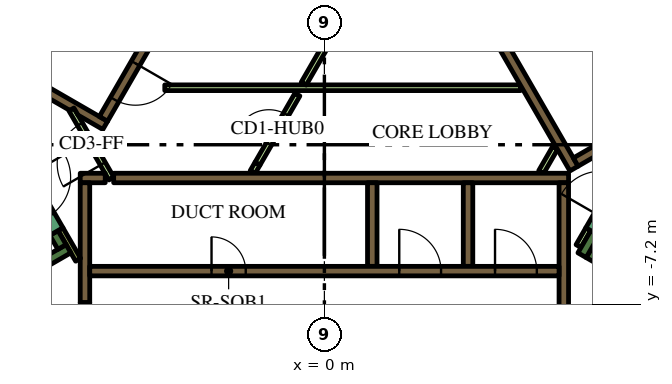
"""IFC4 building model, lengths in metres.
Left out: names, types, materials, properties, quantities, classifications, styles, units other than length and angle.
Written with IfcOpenShell. Run it as: python <this file> out.ifc"""

import sys

from ifc_helpers import new_model, si_unit, direction, frame, frame_2d, origin, place, context, subcontext, project, spatial, polyline, rectangle, outline, extrude, element, fill, save


model = new_model("IFC4")
c1 = context("Model", 3, precision=1e-05, world=origin(), true_north=direction((0.0, 1.0)))
c2 = subcontext(c1, "Body", "Model", "MODEL_VIEW")
j1 = project(units=[si_unit("LENGTHUNIT", "METRE"), si_unit("PLANEANGLEUNIT", "RADIAN")], contexts=[c1])
p1 = place(None, origin())
s1 = spatial("IfcSite", under=j1, at=p1, CompositionType="ELEMENT")
p2 = place(p1, origin())
s2 = spatial("IfcBuilding", under=s1, at=p2, CompositionType="ELEMENT")
p3 = place(p2, frame((0.0, 0.0, 91.5)))
s3 = spatial("IfcBuildingStorey", under=s2, at=p3, CompositionType="ELEMENT", Elevation=91.5)
p4 = place(p3, frame((6.776, 13.364, 0.0), z_axis=(0.0, 0.0, 1.0), x_axis=(0.500004177138, -0.8660229921, 0.0)))
e1 = element("IfcWall", 1, at=p4, inside=s3, PredefinedType="SOLIDWALL", context=c2, shape_type="SweptSolid", body=[
    extrude(rectangle(XDim=20.204, YDim=0.9, at=frame_2d((10.102, 0.0))), origin(), (0.0, 0.0, 1.0), 3.9),
])
p5 = place(p3, frame((-15.36, -1.503, 0.0), z_axis=(0.0, 0.0, 1.0), x_axis=(0.50000389221, 0.866023156604, 0.0)))
e2 = element("IfcWall", 2, at=p5, inside=s3, PredefinedType="SOLIDWALL", context=c2, shape_type="SweptSolid", body=[
    extrude(rectangle(XDim=21.0, YDim=0.9, at=frame_2d((10.5, 0.0))), origin(), (0.0, 0.0, 1.0), 3.9),
])
p6 = place(p3, frame((12.84, -9.261, 0.0), z_axis=(0.0, 0.0, 1.0), x_axis=(-0.866013990052, 0.500019768644, 0.0)))
e3 = element("IfcWall", 3, at=p6, inside=s3, PredefinedType="SOLIDWALL", context=c2, shape_type="SweptSolid", body=[
    extrude(rectangle(XDim=6.8, YDim=0.25, at=frame_2d((3.4, 0.0))), origin(), (0.0, 0.0, 1.0), 3.9),
])
p7 = place(p3, frame((6.78, -5.906, 0.0), z_axis=(0.0, 0.0, 1.0), x_axis=(0.500223362819, 0.865896406789, 0.0)))
e4 = element("IfcWall", 4, at=p7, inside=s3, PredefinedType="SOLIDWALL", context=c2, shape_type="SweptSolid", body=[
    extrude(rectangle(XDim=0.675, YDim=0.25, at=frame_2d((0.337, 0.0))), origin(), (0.0, 0.0, 1.0), 3.9),
])
p8 = place(p3, frame((-12.84, -9.261, 0.0), z_axis=(0.0, 0.0, 1.0), x_axis=(0.866016039709, 0.500016218704, 0.0)))
e5 = element("IfcWall", 5, at=p8, inside=s3, PredefinedType="SOLIDWALL", context=c2, shape_type="SweptSolid", body=[
    extrude(rectangle(XDim=7.05, YDim=0.25, at=frame_2d((3.525, 0.0))), origin(), (0.0, 0.0, 1.0), 3.9),
])
p9 = place(p3, frame((-6.905, -5.69, 0.0), z_axis=(0.0, 0.0, 1.0), x_axis=(-0.500402024738, 0.865793170242, 0.0)))
e6 = element("IfcWall", 6, at=p9, inside=s3, PredefinedType="SOLIDWALL", context=c2, shape_type="SweptSolid", body=[
    extrude(rectangle(XDim=0.425, YDim=0.25, at=frame_2d((0.212, 0.0))), origin(), (0.0, 0.0, 1.0), 3.9),
])
p10 = place(p3, frame((-5.545, -3.875, 0.0), z_axis=(0.0, 0.0, 1.0), x_axis=(1.0, 0.0, 0.0)))
e7 = element("IfcWall", 7, at=p10, inside=s3, PredefinedType="SOLIDWALL", context=c2, shape_type="SweptSolid", body=[
    extrude(rectangle(XDim=11.97, YDim=0.25, at=frame_2d((5.985, 0.0))), origin(), (0.0, 0.0, 1.0), 3.9),
])
p11 = place(p3, frame((-6.425, -3.875, 0.0), z_axis=(0.0, 0.0, 1.0), x_axis=(1.0, 0.0, 0.0)))
e8 = element("IfcWall", 8, at=p11, inside=s3, PredefinedType="SOLIDWALL", context=c2, shape_type="SweptSolid", body=[
    extrude(rectangle(XDim=0.658, YDim=0.25, at=frame_2d((0.329, 0.0))), origin(), (0.0, 0.0, 1.0), 3.9),
])
p12 = place(p3, frame((6.3, -7.268, 0.0), z_axis=(0.0, 0.0, 1.0), x_axis=(0.0, 1.0, 0.0)))
e9 = element("IfcWall", 9, at=p12, inside=s3, PredefinedType="SOLIDWALL", context=c2, shape_type="SweptSolid", body=[
    extrude(rectangle(XDim=3.268, YDim=0.25, at=frame_2d((1.634, 0.0))), origin(), (0.0, 0.0, 1.0), 3.9),
])
for number, where, z_axis, x_axis in (
    (10, (3.78, -4.0, 0.0), (0.0, 0.0, 1.0), (0.0, -1.0, 0.0)),
    (11, (1.26, -4.0, 0.0), (0.0, 0.0, 1.0), (0.0, -1.0, 0.0)),
):
    element("IfcWall", number, at=place(p3, frame(where, z_axis=z_axis, x_axis=x_axis)), inside=s3, PredefinedType="SOLIDWALL", context=c2, shape_type="SweptSolid", body=[
        extrude(rectangle(XDim=2.2, YDim=0.25, at=frame_2d((1.1, 0.0))), origin(), (0.0, 0.0, 1.0), 3.9),
    ])
p13 = place(p3, frame((-6.3, -4.0, 0.0), z_axis=(0.0, 0.0, 1.0), x_axis=(0.0, -1.0, 0.0)))
e12 = element("IfcWall", 12, at=p13, inside=s3, PredefinedType="SOLIDWALL", context=c2, shape_type="SweptSolid", body=[
    extrude(rectangle(XDim=3.154, YDim=0.25, at=frame_2d((1.577, 0.0))), origin(), (0.0, 0.0, 1.0), 3.9),
])
p14 = place(p3, origin())
e13 = element("IfcWall", 13, at=p14, inside=s3, PredefinedType="SOLIDWALL", context=c2, shape_type="SweptSolid", body=[
    extrude(outline(polyline([(0.566, 6.725), (0.566, 6.875), (0.566, 6.875), (0.565, 6.875), (0.361, 6.875), (0.035, 7.439), (0.252, 7.564), (0.377, 7.348), (6.552, -3.348), (6.677, -3.564), (6.46, -3.689), (0.448, 6.725), (0.565, 6.725), (0.566, 6.725), (0.566, 6.725)])), origin(), (0.0, 0.0, 1.0), 3.9),
])
p15 = place(p3, frame((6.614, -3.456, 0.0), z_axis=(0.0, 0.0, 1.0), x_axis=(0.866031582473, 0.499989298045, 0.0)))
e14 = element("IfcWall", 14, at=p15, inside=s3, PredefinedType="SOLIDWALL", context=c2, shape_type="SweptSolid", body=[
    extrude(rectangle(XDim=2.455, YDim=0.25, at=frame_2d((1.228, 0.0))), origin(), (0.0, 0.0, 1.0), 3.9),
])
p16 = place(p3, frame((-8.06, -1.311, 0.0), z_axis=(0.0, 0.0, 1.0), x_axis=(0.50000273126, 0.866023826885, 0.0)))
e15 = element("IfcWall", 15, at=p16, inside=s3, PredefinedType="SOLIDWALL", context=c2, shape_type="SweptSolid", body=[
    extrude(rectangle(XDim=10.33, YDim=0.25, at=frame_2d((5.165, 0.0))), origin(), (0.0, 0.0, 1.0), 3.9),
])
e16 = element("IfcWall", 16, at=p14, inside=s3, PredefinedType="SOLIDWALL", context=c2, shape_type="SweptSolid", body=[
    extrude(outline(polyline([(-5.922, -2.257), (-5.922, -2.257), (-5.705, -2.382), (-5.83, -2.598), (-6.483, -2.221), (-6.591, -2.033), (-6.591, -2.033), (-6.7, -2.096), (-7.952, -1.373), (-7.827, -1.156), (-5.922, -2.257)])), origin(), (0.0, 0.0, 1.0), 3.9),
])
p17 = place(p3, frame((-6.48, -6.027, 0.0), z_axis=(0.0, 0.0, 1.0), x_axis=(-0.499927229454, 0.866067413802, 0.0)))
e17 = element("IfcWall", 17, at=p17, inside=s3, PredefinedType="PARTITIONING", context=c2, shape_type="SweptSolid", body=[
    extrude(rectangle(XDim=0.929, YDim=0.15, at=frame_2d((0.464, 0.0))), origin(), (0.0, 0.0, 1.0), 3.9),
])
p18 = place(p3, frame((-1.887, -3.718, 0.0), z_axis=(0.0, 0.0, 1.0), x_axis=(0.500165633897, 0.865929753888, 0.0)))
e18 = element("IfcWall", 18, at=p18, inside=s3, PredefinedType="PARTITIONING", context=c2, shape_type="SweptSolid", body=[
    extrude(rectangle(XDim=0.254, YDim=0.15, at=frame_2d((0.127, 0.0))), origin(), (0.0, 0.0, 1.0), 2.75),
])
p19 = place(p3, frame((6.945, -5.222, 0.0), z_axis=(0.0, 0.0, 1.0), x_axis=(-0.499818422106, -0.866130212453, 0.0)))
e19 = element("IfcWall", 19, at=p19, inside=s3, PredefinedType="PARTITIONING", context=c2, shape_type="SweptSolid", body=[
    extrude(rectangle(XDim=0.514, YDim=0.15, at=frame_2d((0.257, 0.0))), origin(), (0.0, 0.0, 1.0), 2.75),
])
p20 = place(p3, frame((5.705, -3.718, 0.0), z_axis=(0.0, 0.0, 1.0), x_axis=(0.499962090823, 0.866047289552, 0.0)))
e20 = element("IfcWall", 20, at=p20, inside=s3, PredefinedType="PARTITIONING", context=c2, shape_type="SweptSolid", body=[
    extrude(rectangle(XDim=0.735, YDim=0.15, at=frame_2d((0.367, 0.0))), origin(), (0.0, 0.0, 1.0), 2.75),
])
p21 = place(p3, frame((-4.2, -1.5, 0.0), z_axis=(0.0, 0.0, 1.0), x_axis=(1.0, 0.0, 0.0)))
e21 = element("IfcWall", 21, at=p21, inside=s3, PredefinedType="PARTITIONING", context=c2, shape_type="SweptSolid", body=[
    extrude(rectangle(XDim=9.359, YDim=0.15, at=frame_2d((4.68, 0.0))), origin(), (0.0, 0.0, 1.0), 2.75),
])
p22 = place(p3, frame((-0.544, -1.393, 0.0), z_axis=(0.0, 0.0, 1.0), x_axis=(0.499928740635, 0.866066541489, 0.0)))
e22 = element("IfcWall", 22, at=p22, inside=s3, PredefinedType="PARTITIONING", context=c2, shape_type="SweptSolid", body=[
    extrude(rectangle(XDim=1.912, YDim=0.15, at=frame_2d((0.956, 0.0))), origin(), (0.0, 0.0, 1.0), 2.75),
])
p23 = place(p3, frame((-6.175, -6.325, 0.0), z_axis=(0.0, 0.0, 1.0), x_axis=(1.0, 0.0, 0.0)))
e23 = element("IfcWall", 23, at=p23, inside=s3, PredefinedType="SOLIDWALL", context=c2, shape_type="SweptSolid", body=[
    extrude(rectangle(XDim=12.35, YDim=0.25, at=frame_2d((6.175, 0.0))), origin(), (0.0, 0.0, 1.0), 3.9),
])
p24 = place(p23, frame((3.205, 0.0, 0.0)))
e24 = element("IfcOpeningElement", 24, at=p24, cuts=e23, PredefinedType="OPENING", context=c2, shape_type="SweptSolid", body=[
    extrude(rectangle(XDim=0.9, YDim=2.1, at=frame_2d((0.45, 1.05))), frame((0.0, 0.135, 0.0), z_axis=(0.0, -1.0, 0.0), x_axis=(1.0, 0.0, 0.0)), (0.0, 0.0, 1.0), 0.27),
])
p25 = place(p23, frame((8.145, 0.0, 0.0)))
e25 = element("IfcOpeningElement", 25, at=p25, cuts=e23, PredefinedType="OPENING", context=c2, shape_type="SweptSolid", body=[
    extrude(rectangle(XDim=1.1, YDim=2.1, at=frame_2d((0.55, 1.05))), frame((0.0, 0.135, 0.0), z_axis=(0.0, -1.0, 0.0), x_axis=(1.0, 0.0, 0.0)), (0.0, 0.0, 1.0), 0.27),
])
p26 = place(p23, frame((10.665, 0.0, 0.0)))
e26 = element("IfcOpeningElement", 26, at=p26, cuts=e23, PredefinedType="OPENING", context=c2, shape_type="SweptSolid", body=[
    extrude(rectangle(XDim=1.1, YDim=2.1, at=frame_2d((0.55, 1.05))), frame((0.0, 0.135, 0.0), z_axis=(0.0, -1.0, 0.0), x_axis=(1.0, 0.0, 0.0)), (0.0, 0.0, 1.0), 0.27),
])
p27 = place(p3, frame((8.565, -2.185, 0.0), z_axis=(0.0, 0.0, 1.0), x_axis=(-0.499997954832, 0.866026584559, 0.0)))
e27 = element("IfcWall", 27, at=p27, inside=s3, PredefinedType="SOLIDWALL", context=c2, shape_type="SweptSolid", body=[
    extrude(rectangle(XDim=12.35, YDim=0.25, at=frame_2d((6.175, 0.0))), origin(), (0.0, 0.0, 1.0), 3.9),
])
p28 = place(p27, frame((5.725, 0.0, 0.0)))
e28 = element("IfcOpeningElement", 28, at=p28, cuts=e27, PredefinedType="OPENING", context=c2, shape_type="SweptSolid", body=[
    extrude(rectangle(XDim=0.9, YDim=2.1, at=frame_2d((0.45, 1.05))), frame((0.0, 0.135, 0.0), z_axis=(0.0, -1.0, 0.0), x_axis=(1.0, 0.0, 0.0)), (0.0, 0.0, 1.0), 0.27),
])
p29 = place(p3, frame((-0.898, 6.194, 0.0), z_axis=(0.0, 0.0, 1.0), x_axis=(-0.499996202215, -0.866027596426, 0.0)))
e29 = element("IfcWall", 29, at=p29, inside=s3, PredefinedType="SOLIDWALL", context=c2, shape_type="SweptSolid", body=[
    extrude(rectangle(XDim=9.83, YDim=0.25, at=frame_2d((4.915, 0.0))), origin(), (0.0, 0.0, 1.0), 3.9),
])
p30 = place(p29, frame((0.585, 0.0, 0.0)))
e30 = element("IfcOpeningElement", 30, at=p30, cuts=e29, PredefinedType="OPENING", context=c2, shape_type="SweptSolid", body=[
    extrude(rectangle(XDim=1.1, YDim=2.1, at=frame_2d((0.55, 1.05))), frame((0.0, 0.135, 0.0), z_axis=(0.0, -1.0, 0.0), x_axis=(1.0, 0.0, 0.0)), (0.0, 0.0, 1.0), 0.27),
])
p31 = place(p29, frame((3.105, 0.0, 0.0)))
e31 = element("IfcOpeningElement", 31, at=p31, cuts=e29, PredefinedType="OPENING", context=c2, shape_type="SweptSolid", body=[
    extrude(rectangle(XDim=1.1, YDim=2.1, at=frame_2d((0.55, 1.05))), frame((0.0, 0.135, 0.0), z_axis=(0.0, -1.0, 0.0), x_axis=(1.0, 0.0, 0.0)), (0.0, 0.0, 1.0), 0.27),
])
p32 = place(p29, frame((5.625, 0.0, 0.0)))
e32 = element("IfcOpeningElement", 32, at=p32, cuts=e29, PredefinedType="OPENING", context=c2, shape_type="SweptSolid", body=[
    extrude(rectangle(XDim=1.1, YDim=2.1, at=frame_2d((0.55, 1.05))), frame((0.0, 0.135, 0.0), z_axis=(0.0, -1.0, 0.0), x_axis=(1.0, 0.0, 0.0)), (0.0, 0.0, 1.0), 0.27),
])
p33 = place(p29, frame((8.145, 0.0, 0.0)))
e33 = element("IfcOpeningElement", 33, at=p33, cuts=e29, PredefinedType="OPENING", context=c2, shape_type="SweptSolid", body=[
    extrude(rectangle(XDim=1.1, YDim=2.1, at=frame_2d((0.55, 1.05))), frame((0.0, 0.135, 0.0), z_axis=(0.0, -1.0, 0.0), x_axis=(1.0, 0.0, 0.0)), (0.0, 0.0, 1.0), 0.27),
])
p34 = place(p3, frame((7.053, -5.284, 0.0), z_axis=(0.0, 0.0, 1.0), x_axis=(0.500078061341, 0.865980330357, 0.0)))
e34 = element("IfcWall", 34, at=p34, inside=s3, PredefinedType="SOLIDWALL", context=c2, shape_type="SweptSolid", body=[
    extrude(rectangle(XDim=2.1, YDim=0.4, at=frame_2d((1.05, 0.0))), origin(), (0.0, 0.0, 1.0), 3.9),
])
p35 = place(p34, frame((0.45, 0.0, 0.0)))
e35 = element("IfcOpeningElement", 35, at=p35, cuts=e34, PredefinedType="OPENING", context=c2, shape_type="SweptSolid", body=[
    extrude(rectangle(XDim=1.2, YDim=2.1, at=frame_2d((0.6, 1.05))), frame((0.0, 0.21, 0.0), z_axis=(0.0, -1.0, 0.0), x_axis=(1.0, 0.0, 0.0)), (0.0, 0.0, 1.0), 0.42),
])
p36 = place(p3, frame((-8.103, -3.466, 0.0), z_axis=(0.0, 0.0, 1.0), x_axis=(0.500078061341, -0.865980330357, 0.0)))
e36 = element("IfcWall", 36, at=p36, inside=s3, PredefinedType="SOLIDWALL", context=c2, shape_type="SweptSolid", body=[
    extrude(rectangle(XDim=2.1, YDim=0.4, at=frame_2d((1.05, 0.0))), origin(), (0.0, 0.0, 1.0), 3.9),
])
p37 = place(p36, frame((0.45, 0.0, 0.0)))
e37 = element("IfcOpeningElement", 37, at=p37, cuts=e36, PredefinedType="OPENING", context=c2, shape_type="SweptSolid", body=[
    extrude(rectangle(XDim=1.2, YDim=2.1, at=frame_2d((0.6, 1.05))), frame((0.0, 0.21, 0.0), z_axis=(0.0, -1.0, 0.0), x_axis=(1.0, 0.0, 0.0)), (0.0, 0.0, 1.0), 0.42),
])
p38 = place(p3, frame((-6.3, -7.154, 0.0), z_axis=(0.0, 0.0, 1.0), x_axis=(0.0, -1.0, 0.0)))
e38 = element("IfcWall", 38, at=p38, inside=s3, PredefinedType="SOLIDWALL", context=c2, shape_type="SweptSolid", body=[
    extrude(rectangle(XDim=1.8, YDim=0.25, at=frame_2d((0.9, 0.0))), origin(), (0.0, 0.0, 1.0), 3.9),
])
p39 = place(p38, frame((0.45, 0.0, 0.0)))
e39 = element("IfcOpeningElement", 39, at=p39, cuts=e38, PredefinedType="OPENING", context=c2, shape_type="SweptSolid", body=[
    extrude(rectangle(XDim=0.9, YDim=2.1, at=frame_2d((0.45, 1.05))), frame((0.0, 0.135, 0.0), z_axis=(0.0, -1.0, 0.0), x_axis=(1.0, 0.0, 0.0)), (0.0, 0.0, 1.0), 0.27),
])
p40 = place(p3, frame((-1.76, -3.498, 0.0), z_axis=(0.0, 0.0, 1.0), x_axis=(0.499977374825, 0.866038466041, 0.0)))
e40 = element("IfcWall", 40, at=p40, inside=s3, PredefinedType="PARTITIONING", context=c2, shape_type="SweptSolid", body=[
    extrude(rectangle(XDim=2.1, YDim=0.15, at=frame_2d((1.05, 0.0))), origin(), (0.0, 0.0, 1.0), 2.75),
])
p41 = place(p40, frame((0.6, 0.0, 0.0)))
e41 = element("IfcOpeningElement", 41, at=p41, cuts=e40, PredefinedType="OPENING", context=c2, shape_type="SweptSolid", body=[
    extrude(rectangle(XDim=0.9, YDim=2.1, at=frame_2d((0.45, 1.05))), frame((0.0, 0.085, 0.0), z_axis=(0.0, -1.0, 0.0), x_axis=(1.0, 0.0, 0.0)), (0.0, 0.0, 1.0), 0.17),
])
p42 = place(p3, frame((-5.606, -3.89, 0.0), z_axis=(0.0, 0.0, 1.0), x_axis=(-0.500027713859, 0.866009402589, 0.0)))
e42 = element("IfcWall", 42, at=p42, inside=s3, PredefinedType="PARTITIONING", context=c2, shape_type="SweptSolid", body=[
    extrude(rectangle(XDim=2.1, YDim=0.15, at=frame_2d((1.05, 0.0))), origin(), (0.0, 0.0, 1.0), 2.75),
])
p43 = place(p42, frame((0.45, 0.0, 0.0)))
e43 = element("IfcOpeningElement", 43, at=p43, cuts=e42, PredefinedType="OPENING", context=c2, shape_type="SweptSolid", body=[
    extrude(rectangle(XDim=1.2, YDim=2.1, at=frame_2d((0.6, 1.05))), frame((0.0, 0.085, 0.0), z_axis=(0.0, -1.0, 0.0), x_axis=(1.0, 0.0, 0.0)), (0.0, 0.0, 1.0), 0.17),
])
p44 = place(p3, frame((6.163, 18.475, 0.0), z_axis=(0.0, 0.0, 1.0), x_axis=(0.500001317485, -0.866024643133, 0.0)))
e44 = element("IfcWall", 44, at=p44, inside=s3, PredefinedType="PARTITIONING", context=c2, shape_type="SweptSolid", body=[
    extrude(rectangle(XDim=25.767, YDim=0.15, at=frame_2d((12.883, 0.0))), origin(), (0.0, 0.0, 1.0), 2.75),
])
p45 = place(p44, frame((24.241, 0.0, 0.0)))
e45 = element("IfcOpeningElement", 45, at=p45, cuts=e44, PredefinedType="OPENING", context=c2, shape_type="SweptSolid", body=[
    extrude(rectangle(XDim=1.0, YDim=2.1, at=frame_2d((0.5, 1.05))), frame((0.0, 0.085, 0.0), z_axis=(0.0, -1.0, 0.0), x_axis=(1.0, 0.0, 0.0)), (0.0, 0.0, 1.0), 0.17),
])
p46 = place(p44, frame((13.144, 0.0, 0.0)))
e46 = element("IfcOpeningElement", 46, at=p46, cuts=e44, PredefinedType="OPENING", context=c2, shape_type="SweptSolid", body=[
    extrude(rectangle(XDim=1.0, YDim=2.1, at=frame_2d((0.5, 1.05))), frame((0.0, 0.085, 0.0), z_axis=(0.0, -1.0, 0.0), x_axis=(1.0, 0.0, 0.0)), (0.0, 0.0, 1.0), 0.17),
])
p47 = place(p44, frame((10.874, 0.0, 0.0)))
e47 = element("IfcOpeningElement", 47, at=p47, cuts=e44, PredefinedType="OPENING", context=c2, shape_type="SweptSolid", body=[
    extrude(rectangle(XDim=0.9, YDim=2.1, at=frame_2d((0.45, 1.05))), frame((0.0, 0.085, 0.0), z_axis=(0.0, -1.0, 0.0), x_axis=(1.0, 0.0, 0.0)), (0.0, 0.0, 1.0), 0.17),
])
p48 = place(p44, frame((3.718, 0.0, 0.0)))
e48 = element("IfcOpeningElement", 48, at=p48, cuts=e44, PredefinedType="OPENING", context=c2, shape_type="SweptSolid", body=[
    extrude(rectangle(XDim=1.1, YDim=2.1, at=frame_2d((0.55, 1.05))), frame((0.0, 0.085, 0.0), z_axis=(0.0, -1.0, 0.0), x_axis=(1.0, 0.0, 0.0)), (0.0, 0.0, 1.0), 0.17),
])
p49 = place(p44, frame((2.411, 0.0, 0.0)))
e49 = element("IfcOpeningElement", 49, at=p49, cuts=e44, PredefinedType="OPENING", context=c2, shape_type="SweptSolid", body=[
    extrude(rectangle(XDim=1.0, YDim=2.1, at=frame_2d((0.5, 1.05))), frame((0.0, 0.085, 0.0), z_axis=(0.0, -1.0, 0.0), x_axis=(1.0, 0.0, 0.0)), (0.0, 0.0, 1.0), 0.17),
])
p50 = place(p3, frame((-19.081, -3.9, 0.0), z_axis=(0.0, 0.0, 1.0), x_axis=(0.499998313975, 0.866026377209, 0.0)))
e50 = element("IfcWall", 50, at=p50, inside=s3, PredefinedType="PARTITIONING", context=c2, shape_type="SweptSolid", body=[
    extrude(rectangle(XDim=25.766, YDim=0.15, at=frame_2d((12.883, 0.0))), origin(), (0.0, 0.0, 1.0), 2.75),
])
p51 = place(p50, frame((19.306, 0.0, 0.0)))
e51 = element("IfcOpeningElement", 51, at=p51, cuts=e50, PredefinedType="OPENING", context=c2, shape_type="SweptSolid", body=[
    extrude(rectangle(XDim=1.0, YDim=2.1, at=frame_2d((0.5, 1.05))), frame((0.0, 0.085, 0.0), z_axis=(0.0, -1.0, 0.0), x_axis=(1.0, 0.0, 0.0)), (0.0, 0.0, 1.0), 0.17),
])
p52 = place(p50, frame((18.0, 0.0, 0.0)))
e52 = element("IfcOpeningElement", 52, at=p52, cuts=e50, PredefinedType="OPENING", context=c2, shape_type="SweptSolid", body=[
    extrude(rectangle(XDim=1.0, YDim=2.1, at=frame_2d((0.5, 1.05))), frame((0.0, 0.085, 0.0), z_axis=(0.0, -1.0, 0.0), x_axis=(1.0, 0.0, 0.0)), (0.0, 0.0, 1.0), 0.17),
])
p53 = place(p50, frame((10.874, 0.0, 0.0)))
e53 = element("IfcOpeningElement", 53, at=p53, cuts=e50, PredefinedType="OPENING", context=c2, shape_type="SweptSolid", body=[
    extrude(rectangle(XDim=0.9, YDim=2.1, at=frame_2d((0.45, 1.05))), frame((0.0, 0.085, 0.0), z_axis=(0.0, -1.0, 0.0), x_axis=(1.0, 0.0, 0.0)), (0.0, 0.0, 1.0), 0.17),
])
p54 = place(p50, frame((8.548, 0.0, 0.0)))
e54 = element("IfcOpeningElement", 54, at=p54, cuts=e50, PredefinedType="OPENING", context=c2, shape_type="SweptSolid", body=[
    extrude(rectangle(XDim=1.1, YDim=2.1, at=frame_2d((0.55, 1.05))), frame((0.0, 0.085, 0.0), z_axis=(0.0, -1.0, 0.0), x_axis=(1.0, 0.0, 0.0)), (0.0, 0.0, 1.0), 0.17),
])
p55 = place(p50, frame((0.18, 0.0, 0.0)))
e55 = element("IfcOpeningElement", 55, at=p55, cuts=e50, PredefinedType="OPENING", context=c2, shape_type="SweptSolid", body=[
    extrude(rectangle(XDim=1.0, YDim=2.1, at=frame_2d((0.5, 1.05))), frame((0.0, 0.085, 0.0), z_axis=(0.0, -1.0, 0.0), x_axis=(1.0, 0.0, 0.0)), (0.0, 0.0, 1.0), 0.17),
])
p56 = place(p24, origin())
e56 = element("IfcDoor", 56, at=p56, inside=s3, OperationType="SINGLE_SWING_LEFT", PredefinedType="DOOR", context=c2, shape_type="SweptSolid", body=[
    extrude(rectangle(XDim=0.9, YDim=2.1, at=frame_2d((0.45, 1.05))), frame((0.0, 0.025, 0.0), z_axis=(0.0, -1.0, 0.0), x_axis=(1.0, 0.0, 0.0)), (0.0, 0.0, 1.0), 0.05),
])
fill(e24, e56)
p57 = place(p25, origin())
e57 = element("IfcDoor", 57, at=p57, inside=s3, OperationType="DOUBLE_DOOR_SLIDING", PredefinedType="DOOR", context=c2, shape_type="SweptSolid", body=[
    extrude(rectangle(XDim=1.1, YDim=2.1, at=frame_2d((0.55, 1.05))), frame((0.0, 0.025, 0.0), z_axis=(0.0, -1.0, 0.0), x_axis=(1.0, 0.0, 0.0)), (0.0, 0.0, 1.0), 0.05),
])
fill(e25, e57)
p58 = place(p26, origin())
e58 = element("IfcDoor", 58, at=p58, inside=s3, OperationType="DOUBLE_DOOR_SLIDING", PredefinedType="DOOR", context=c2, shape_type="SweptSolid", body=[
    extrude(rectangle(XDim=1.1, YDim=2.1, at=frame_2d((0.55, 1.05))), frame((0.0, 0.025, 0.0), z_axis=(0.0, -1.0, 0.0), x_axis=(1.0, 0.0, 0.0)), (0.0, 0.0, 1.0), 0.05),
])
fill(e26, e58)
p59 = place(p33, origin())
e59 = element("IfcDoor", 59, at=p59, inside=s3, OperationType="DOUBLE_DOOR_SLIDING", PredefinedType="DOOR", context=c2, shape_type="SweptSolid", body=[
    extrude(rectangle(XDim=1.1, YDim=2.1, at=frame_2d((0.55, 1.05))), frame((0.0, 0.025, 0.0), z_axis=(0.0, -1.0, 0.0), x_axis=(1.0, 0.0, 0.0)), (0.0, 0.0, 1.0), 0.05),
])
fill(e33, e59)
p60 = place(p41, origin())
e60 = element("IfcDoor", 60, at=p60, inside=s3, OperationType="SINGLE_SWING_LEFT", PredefinedType="DOOR", context=c2, shape_type="SweptSolid", body=[
    extrude(rectangle(XDim=0.9, YDim=2.1, at=frame_2d((0.45, 1.05))), frame((0.0, 0.025, 0.0), z_axis=(0.0, -1.0, 0.0), x_axis=(1.0, 0.0, 0.0)), (0.0, 0.0, 1.0), 0.05),
])
fill(e41, e60)
p61 = place(p43, origin())
e61 = element("IfcDoor", 61, at=p61, inside=s3, OperationType="SINGLE_SWING_LEFT", PredefinedType="DOOR", context=c2, shape_type="SweptSolid", body=[
    extrude(rectangle(XDim=1.2, YDim=2.1, at=frame_2d((0.6, 1.05))), frame((0.0, 0.025, 0.0), z_axis=(0.0, -1.0, 0.0), x_axis=(1.0, 0.0, 0.0)), (0.0, 0.0, 1.0), 0.05),
])
fill(e43, e61)
save(model, sys.argv[1])
